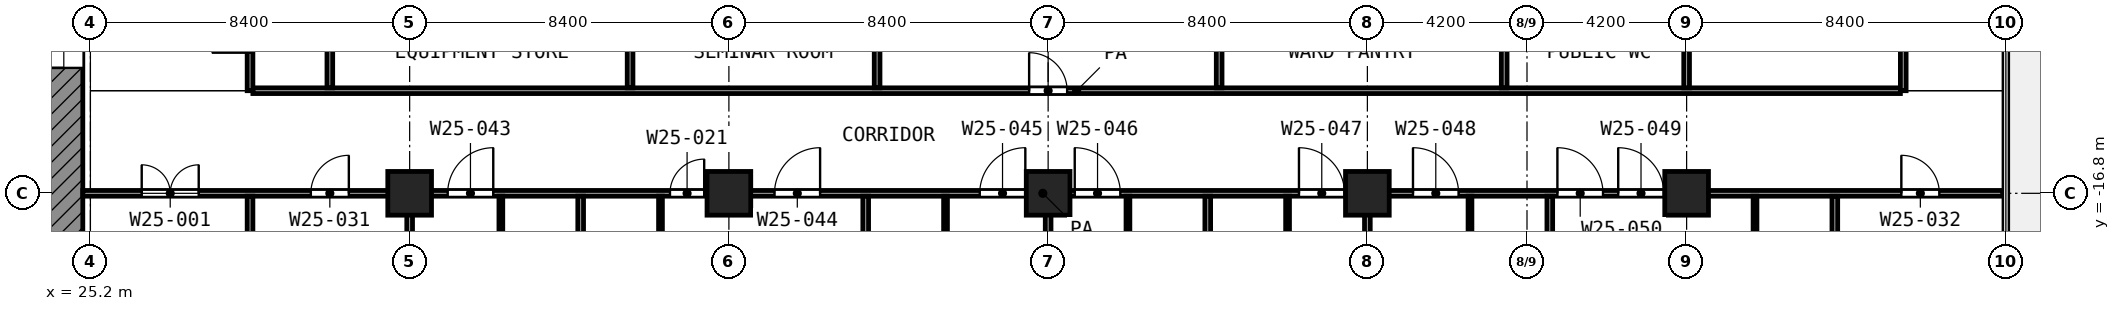
"""IFC4 building model, lengths in metres.
Left out: names, types, materials, properties, quantities, classifications, styles, units other than length and angle.
Written with IfcOpenShell. Run it as: python <this file> out.ifc"""

import sys

from ifc_helpers import new_model, si_unit, direction, frame, frame_2d, origin, origin_2d, place, context, subcontext, project, spatial, rectangle, extrude, element, fill, save


model = new_model("IFC4")
c1 = context("Model", 3, precision=1e-05, world=origin(), true_north=direction((0.0, 1.0)))
c2 = subcontext(c1, "Body", "Model", "MODEL_VIEW")
j1 = project(units=[si_unit("LENGTHUNIT", "METRE"), si_unit("PLANEANGLEUNIT", "RADIAN")], contexts=[c1])
p1 = place(None, origin())
s1 = spatial("IfcSite", under=j1, at=p1, CompositionType="ELEMENT")
p2 = place(p1, origin())
s2 = spatial("IfcBuilding", under=s1, at=p2, CompositionType="ELEMENT")
p3 = place(p2, frame((0.0, 0.0, 132.4)))
s3 = spatial("IfcBuildingStorey", under=s2, at=p3, CompositionType="ELEMENT", Elevation=132.4)
for number, where, z_axis, x_axis in (
    (1, (33.6, -16.8, 0.0), (0.0, 0.0, 1.0), (1.0, 0.0, 0.0)),
    (2, (42.0, -16.8, 0.0), (0.0, 0.0, 1.0), (1.0, 0.0, 0.0)),
    (3, (50.4, -16.8, 0.0), (0.0, 0.0, 1.0), (1.0, 0.0, 0.0)),
    (4, (58.8, -16.8, 0.0), (0.0, 0.0, 1.0), (1.0, 0.0, 0.0)),
    (5, (67.2, -16.8, 0.0), (0.0, 0.0, 1.0), (1.0, 0.0, 0.0)),
):
    element("IfcColumn", number, at=place(p3, frame(where, z_axis=z_axis, x_axis=x_axis)), inside=s3, PredefinedType="COLUMN", context=c2, shape_type="SweptSolid", body=[
        extrude(rectangle(XDim=1.15, YDim=1.15, at=origin_2d()), origin(), (0.0, 0.0, 1.0), 4.2),
    ])
p4 = place(p3, frame((24.5, -24.0, 0.0), z_axis=(0.0, 0.0, 1.0), x_axis=(0.0, 1.0, 0.0)))
e6 = element("IfcWall", 6, at=p4, inside=s3, PredefinedType="SHEAR", context=c2, shape_type="SweptSolid", body=[
    extrude(rectangle(XDim=18.6, YDim=1.0, at=frame_2d((9.3, 0.0))), origin(), (0.0, 0.0, 1.0), 3.6),
])
p5 = place(p4, frame((10.5, 0.0, 0.0)))
e7 = element("IfcOpeningElement", 7, at=p5, cuts=e6, PredefinedType="OPENING", context=c2, shape_type="SweptSolid", body=[
    extrude(rectangle(XDim=1.8, YDim=2.1, at=frame_2d((0.9, 1.05))), frame((0.0, 0.51, 0.0), z_axis=(0.0, -1.0, 0.0), x_axis=(1.0, 0.0, 0.0)), (0.0, 0.0, 1.0), 1.02),
])
p6 = place(p3, frame((36.0, -20.1, 0.0), z_axis=(0.0, 0.0, 1.0), x_axis=(0.0, 1.0, 0.0)))
e8 = element("IfcWall", 8, at=p6, inside=s3, PredefinedType="PARTITIONING", context=c2, shape_type="SweptSolid", body=[
    extrude(rectangle(XDim=3.225, YDim=0.1, at=frame_2d((1.613, 0.0))), origin(), (0.0, 0.0, 1.0), 3.6),
])
p7 = place(p3, frame((40.2, -19.499, 0.0), z_axis=(0.0, 0.0, 1.0), x_axis=(0.0, 1.0, 0.0)))
e9 = element("IfcWall", 9, at=p7, inside=s3, PredefinedType="PARTITIONING", context=c2, shape_type="SweptSolid", body=[
    extrude(rectangle(XDim=2.624, YDim=0.1, at=frame_2d((1.312, 0.0))), origin(), (0.0, 0.0, 1.0), 3.6),
])
for number, where, z_axis, x_axis in (
    (10, (47.7, -20.1, 0.0), (0.0, 0.0, 1.0), (0.0, 1.0, 0.0)),
    (11, (52.5, -20.1, 0.0), (0.0, 0.0, 1.0), (0.0, 1.0, 0.0)),
):
    element("IfcWall", number, at=place(p3, frame(where, z_axis=z_axis, x_axis=x_axis)), inside=s3, PredefinedType="PARTITIONING", context=c2, shape_type="SweptSolid", body=[
        extrude(rectangle(XDim=3.225, YDim=0.1, at=frame_2d((1.613, 0.0))), origin(), (0.0, 0.0, 1.0), 3.6),
    ])
for number, where, z_axis, x_axis in (
    (12, (56.7, -19.5, 0.0), (0.0, 0.0, 1.0), (0.0, 1.0, 0.0)),
    (13, (61.5, -19.5, 0.0), (0.0, 0.0, 1.0), (0.0, 1.0, 0.0)),
):
    element("IfcWall", number, at=place(p3, frame(where, z_axis=z_axis, x_axis=x_axis)), inside=s3, PredefinedType="PARTITIONING", context=c2, shape_type="SweptSolid", body=[
        extrude(rectangle(XDim=2.625, YDim=0.1, at=frame_2d((1.312, 0.0))), origin(), (0.0, 0.0, 1.0), 3.6),
    ])
p8 = place(p3, frame((69.0, -20.099, 0.0), z_axis=(0.0, 0.0, 1.0), x_axis=(0.0, 1.0, 0.0)))
e14 = element("IfcWall", 14, at=p8, inside=s3, PredefinedType="PARTITIONING", context=c2, shape_type="SweptSolid", body=[
    extrude(rectangle(XDim=3.224, YDim=0.1, at=frame_2d((1.612, 0.0))), origin(), (0.0, 0.0, 1.0), 3.6),
])
p9 = place(p3, frame((25.0, -16.8, 0.0), z_axis=(0.0, 0.0, 1.0), x_axis=(1.0, 0.0, 0.0)))
e15 = element("IfcWall", 15, at=p9, inside=s3, PredefinedType="PARTITIONING", context=c2, shape_type="SweptSolid", body=[
    extrude(rectangle(XDim=50.52, YDim=0.15, at=frame_2d((25.26, 0.0))), origin(), (0.0, 0.0, 1.0), 3.6),
])
p10 = place(p9, frame((1.55, 0.0, 0.0)))
e16 = element("IfcOpeningElement", 16, at=p10, cuts=e15, PredefinedType="OPENING", context=c2, shape_type="SweptSolid", body=[
    extrude(rectangle(XDim=1.5, YDim=2.1, at=frame_2d((0.75, 1.05))), frame((0.0, 0.085, 0.0), z_axis=(0.0, -1.0, 0.0), x_axis=(1.0, 0.0, 0.0)), (0.0, 0.0, 1.0), 0.17),
])
p11 = place(p9, frame((6.0, 0.0, 0.0)))
e17 = element("IfcOpeningElement", 17, at=p11, cuts=e15, PredefinedType="OPENING", context=c2, shape_type="SweptSolid", body=[
    extrude(rectangle(XDim=1.0, YDim=2.1, at=frame_2d((0.5, 1.05))), frame((0.0, 0.085, 0.0), z_axis=(0.0, -1.0, 0.0), x_axis=(1.0, 0.0, 0.0)), (0.0, 0.0, 1.0), 0.17),
])
p12 = place(p9, frame((9.6, 0.0, 0.0)))
e18 = element("IfcOpeningElement", 18, at=p12, cuts=e15, PredefinedType="OPENING", context=c2, shape_type="SweptSolid", body=[
    extrude(rectangle(XDim=1.2, YDim=2.1, at=frame_2d((0.6, 1.05))), frame((0.0, 0.085, 0.0), z_axis=(0.0, -1.0, 0.0), x_axis=(1.0, 0.0, 0.0)), (0.0, 0.0, 1.0), 0.17),
])
p13 = place(p9, frame((18.2, 0.0, 0.0)))
e19 = element("IfcOpeningElement", 19, at=p13, cuts=e15, PredefinedType="OPENING", context=c2, shape_type="SweptSolid", body=[
    extrude(rectangle(XDim=1.2, YDim=2.1, at=frame_2d((0.6, 1.05))), frame((0.0, 0.085, 0.0), z_axis=(0.0, -1.0, 0.0), x_axis=(1.0, 0.0, 0.0)), (0.0, 0.0, 1.0), 0.17),
])
p14 = place(p9, frame((15.45, 0.0, 0.0)))
e20 = element("IfcOpeningElement", 20, at=p14, cuts=e15, PredefinedType="OPENING", context=c2, shape_type="SweptSolid", body=[
    extrude(rectangle(XDim=0.9, YDim=2.1, at=frame_2d((0.45, 1.05))), frame((0.0, 0.085, 0.0), z_axis=(0.0, -1.0, 0.0), x_axis=(1.0, 0.0, 0.0)), (0.0, 0.0, 1.0), 0.17),
])
p15 = place(p9, frame((23.6, 0.0, 0.0)))
e21 = element("IfcOpeningElement", 21, at=p15, cuts=e15, PredefinedType="OPENING", context=c2, shape_type="SweptSolid", body=[
    extrude(rectangle(XDim=1.2, YDim=2.1, at=frame_2d((0.6, 1.05))), frame((0.0, 0.085, 0.0), z_axis=(0.0, -1.0, 0.0), x_axis=(1.0, 0.0, 0.0)), (0.0, 0.0, 1.0), 0.17),
])
p16 = place(p9, frame((26.1, 0.0, 0.0)))
e22 = element("IfcOpeningElement", 22, at=p16, cuts=e15, PredefinedType="OPENING", context=c2, shape_type="SweptSolid", body=[
    extrude(rectangle(XDim=1.2, YDim=2.1, at=frame_2d((0.6, 1.05))), frame((0.0, 0.085, 0.0), z_axis=(0.0, -1.0, 0.0), x_axis=(1.0, 0.0, 0.0)), (0.0, 0.0, 1.0), 0.17),
])
p17 = place(p9, frame((32.0, 0.0, 0.0)))
e23 = element("IfcOpeningElement", 23, at=p17, cuts=e15, PredefinedType="OPENING", context=c2, shape_type="SweptSolid", body=[
    extrude(rectangle(XDim=1.2, YDim=2.1, at=frame_2d((0.6, 1.05))), frame((0.0, 0.085, 0.0), z_axis=(0.0, -1.0, 0.0), x_axis=(1.0, 0.0, 0.0)), (0.0, 0.0, 1.0), 0.17),
])
p18 = place(p9, frame((35.0, 0.0, 0.0)))
e24 = element("IfcOpeningElement", 24, at=p18, cuts=e15, PredefinedType="OPENING", context=c2, shape_type="SweptSolid", body=[
    extrude(rectangle(XDim=1.2, YDim=2.1, at=frame_2d((0.6, 1.05))), frame((0.0, 0.085, 0.0), z_axis=(0.0, -1.0, 0.0), x_axis=(1.0, 0.0, 0.0)), (0.0, 0.0, 1.0), 0.17),
])
p19 = place(p9, frame((40.4, 0.0, 0.0)))
e25 = element("IfcOpeningElement", 25, at=p19, cuts=e15, PredefinedType="OPENING", context=c2, shape_type="SweptSolid", body=[
    extrude(rectangle(XDim=1.2, YDim=2.1, at=frame_2d((0.6, 1.05))), frame((0.0, 0.085, 0.0), z_axis=(0.0, -1.0, 0.0), x_axis=(1.0, 0.0, 0.0)), (0.0, 0.0, 1.0), 0.17),
])
p20 = place(p9, frame((38.8, 0.0, 0.0)))
e26 = element("IfcOpeningElement", 26, at=p20, cuts=e15, PredefinedType="OPENING", context=c2, shape_type="SweptSolid", body=[
    extrude(rectangle(XDim=1.2, YDim=2.1, at=frame_2d((0.6, 1.05))), frame((0.0, 0.085, 0.0), z_axis=(0.0, -1.0, 0.0), x_axis=(1.0, 0.0, 0.0)), (0.0, 0.0, 1.0), 0.17),
])
p21 = place(p9, frame((47.85, 0.0, 0.0)))
e27 = element("IfcOpeningElement", 27, at=p21, cuts=e15, PredefinedType="OPENING", context=c2, shape_type="SweptSolid", body=[
    extrude(rectangle(XDim=1.0, YDim=2.1, at=frame_2d((0.5, 1.05))), frame((0.0, 0.085, 0.0), z_axis=(0.0, -1.0, 0.0), x_axis=(1.0, 0.0, 0.0)), (0.0, 0.0, 1.0), 0.17),
])
p22 = place(p3, frame((29.475, -14.1, 0.0), z_axis=(0.0, 0.0, 1.0), x_axis=(1.0, 0.0, 0.0)))
e28 = element("IfcWall", 28, at=p22, inside=s3, PredefinedType="PARTITIONING", context=c2, shape_type="SweptSolid", body=[
    extrude(rectangle(XDim=43.35, YDim=0.15, at=frame_2d((21.675, 0.0))), origin(), (0.0, 0.0, 1.0), 3.6),
])
p23 = place(p22, frame((20.425, 0.0, 0.0)))
e29 = element("IfcOpeningElement", 29, at=p23, cuts=e28, PredefinedType="OPENING", context=c2, shape_type="SweptSolid", body=[
    extrude(rectangle(XDim=1.0, YDim=2.1, at=frame_2d((0.5, 1.05))), frame((0.0, 0.085, 0.0), z_axis=(0.0, -1.0, 0.0), x_axis=(1.0, 0.0, 0.0)), (0.0, 0.0, 1.0), 0.17),
])
p24 = place(p3, frame((29.4, -25.2, 0.0), z_axis=(0.0, 0.0, 1.0), x_axis=(0.0, 1.0, 0.0)))
e30 = element("IfcWall", 30, at=p24, inside=s3, PredefinedType="PARTITIONING", context=c2, shape_type="SweptSolid", body=[
    extrude(rectangle(XDim=8.325, YDim=0.15, at=frame_2d((4.163, 0.0))), origin(), (0.0, 0.0, 1.0), 3.6),
])
p25 = place(p3, frame((29.4, -14.1, 0.0), z_axis=(0.0, 0.0, 1.0), x_axis=(0.0, 1.0, 0.0)))
e31 = element("IfcWall", 31, at=p25, inside=s3, PredefinedType="PARTITIONING", context=c2, shape_type="SweptSolid", body=[
    extrude(rectangle(XDim=3.0, YDim=0.15, at=frame_2d((1.5, 0.0))), origin(), (0.0, 0.0, 1.0), 3.6),
])
p26 = place(p25, frame((1.0, 0.0, 0.0)))
e32 = element("IfcOpeningElement", 32, at=p26, cuts=e31, PredefinedType="OPENING", context=c2, shape_type="SweptSolid", body=[
    extrude(rectangle(XDim=1.0, YDim=2.1, at=frame_2d((0.5, 1.05))), frame((0.0, 0.085, 0.0), z_axis=(0.0, -1.0, 0.0), x_axis=(1.0, 0.0, 0.0)), (0.0, 0.0, 1.0), 0.17),
])
p27 = place(p3, frame((31.5, -14.025, 0.0), z_axis=(0.0, 0.0, 1.0), x_axis=(0.0, 1.0, 0.0)))
e33 = element("IfcWall", 33, at=p27, inside=s3, PredefinedType="PARTITIONING", context=c2, shape_type="SweptSolid", body=[
    extrude(rectangle(XDim=2.85, YDim=0.15, at=frame_2d((1.425, 0.0))), origin(), (0.0, 0.0, 1.0), 3.6),
])
for number, where, z_axis, x_axis in (
    (34, (33.6, -25.12, 0.0), (0.0, 0.0, 1.0), (0.0, 1.0, 0.0)),
    (35, (38.1, -25.12, 0.0), (0.0, 0.0, 1.0), (0.0, 1.0, 0.0)),
):
    element("IfcWall", number, at=place(p3, frame(where, z_axis=z_axis, x_axis=x_axis)), inside=s3, PredefinedType="PARTITIONING", context=c2, shape_type="SweptSolid", body=[
        extrude(rectangle(XDim=8.245, YDim=0.15, at=frame_2d((4.123, 0.0))), origin(), (0.0, 0.0, 1.0), 2.7),
    ])
p28 = place(p3, frame((39.4, -14.025, 0.0), z_axis=(0.0, 0.0, 1.0), x_axis=(0.0, 1.0, 0.0)))
e36 = element("IfcWall", 36, at=p28, inside=s3, PredefinedType="PARTITIONING", context=c2, shape_type="SweptSolid", body=[
    extrude(rectangle(XDim=2.85, YDim=0.15, at=frame_2d((1.425, 0.0))), origin(), (0.0, 0.0, 1.0), 3.6),
])
p29 = place(p3, frame((45.6, -25.12, 0.0), z_axis=(0.0, 0.0, 1.0), x_axis=(0.0, 1.0, 0.0)))
e37 = element("IfcWall", 37, at=p29, inside=s3, PredefinedType="PARTITIONING", context=c2, shape_type="SweptSolid", body=[
    extrude(rectangle(XDim=8.245, YDim=0.15, at=frame_2d((4.123, 0.0))), origin(), (0.0, 0.0, 1.0), 2.7),
])
p30 = place(p3, frame((45.9, -14.025, 0.0), z_axis=(0.0, 0.0, 1.0), x_axis=(0.0, 1.0, 0.0)))
e38 = element("IfcWall", 38, at=p30, inside=s3, PredefinedType="PARTITIONING", context=c2, shape_type="SweptSolid", body=[
    extrude(rectangle(XDim=2.85, YDim=0.15, at=frame_2d((1.425, 0.0))), origin(), (0.0, 0.0, 1.0), 3.6),
])
p31 = place(p3, frame((50.4, -25.12, 0.0), z_axis=(0.0, 0.0, 1.0), x_axis=(0.0, 1.0, 0.0)))
e39 = element("IfcWall", 39, at=p31, inside=s3, PredefinedType="PARTITIONING", context=c2, shape_type="SweptSolid", body=[
    extrude(rectangle(XDim=8.245, YDim=0.15, at=frame_2d((4.123, 0.0))), origin(), (0.0, 0.0, 1.0), 3.6),
])
p32 = place(p3, frame((54.6, -25.12, 0.0), z_axis=(0.0, 0.0, 1.0), x_axis=(0.0, 1.0, 0.0)))
e40 = element("IfcWall", 40, at=p32, inside=s3, PredefinedType="PARTITIONING", context=c2, shape_type="SweptSolid", body=[
    extrude(rectangle(XDim=8.245, YDim=0.15, at=frame_2d((4.123, 0.0))), origin(), (0.0, 0.0, 1.0), 2.7),
])
p33 = place(p3, frame((54.9, -14.025, 0.0), z_axis=(0.0, 0.0, 1.0), x_axis=(0.0, 1.0, 0.0)))
e41 = element("IfcWall", 41, at=p33, inside=s3, PredefinedType="PARTITIONING", context=c2, shape_type="SweptSolid", body=[
    extrude(rectangle(XDim=2.85, YDim=0.15, at=frame_2d((1.425, 0.0))), origin(), (0.0, 0.0, 1.0), 3.6),
])
p34 = place(p3, frame((58.8, -25.12, 0.0), z_axis=(0.0, 0.0, 1.0), x_axis=(0.0, 1.0, 0.0)))
e42 = element("IfcWall", 42, at=p34, inside=s3, PredefinedType="PARTITIONING", context=c2, shape_type="SweptSolid", body=[
    extrude(rectangle(XDim=8.245, YDim=0.15, at=frame_2d((4.123, 0.0))), origin(), (0.0, 0.0, 1.0), 3.6),
])
p35 = place(p3, frame((62.4, -14.025, 0.0), z_axis=(0.0, 0.0, 1.0), x_axis=(0.0, 1.0, 0.0)))
e43 = element("IfcWall", 43, at=p35, inside=s3, PredefinedType="PARTITIONING", context=c2, shape_type="SweptSolid", body=[
    extrude(rectangle(XDim=2.85, YDim=0.15, at=frame_2d((1.425, 0.0))), origin(), (0.0, 0.0, 1.0), 3.6),
])
p36 = place(p3, frame((63.6, -25.12, 0.0), z_axis=(0.0, 0.0, 1.0), x_axis=(0.0, 1.0, 0.0)))
e44 = element("IfcWall", 44, at=p36, inside=s3, PredefinedType="PARTITIONING", context=c2, shape_type="SweptSolid", body=[
    extrude(rectangle(XDim=8.245, YDim=0.15, at=frame_2d((4.123, 0.0))), origin(), (0.0, 0.0, 1.0), 2.7),
])
p37 = place(p3, frame((67.2, -14.025, 0.0), z_axis=(0.0, 0.0, 1.0), x_axis=(0.0, 1.0, 0.0)))
e45 = element("IfcWall", 45, at=p37, inside=s3, PredefinedType="PARTITIONING", context=c2, shape_type="SweptSolid", body=[
    extrude(rectangle(XDim=2.85, YDim=0.15, at=frame_2d((1.425, 0.0))), origin(), (0.0, 0.0, 1.0), 3.6),
])
p38 = place(p3, frame((71.1, -23.587, 0.0), z_axis=(0.0, 0.0, 1.0), x_axis=(0.0, 1.0, 0.0)))
e46 = element("IfcWall", 46, at=p38, inside=s3, PredefinedType="PARTITIONING", context=c2, shape_type="SweptSolid", body=[
    extrude(rectangle(XDim=6.712, YDim=0.15, at=frame_2d((3.356, 0.0))), origin(), (0.0, 0.0, 1.0), 2.7),
])
p39 = place(p3, frame((72.9, -14.1, 0.0), z_axis=(0.0, 0.0, 1.0), x_axis=(0.0, 1.0, 0.0)))
e47 = element("IfcWall", 47, at=p39, inside=s3, PredefinedType="PARTITIONING", context=c2, shape_type="SweptSolid", body=[
    extrude(rectangle(XDim=3.0, YDim=0.15, at=frame_2d((1.5, 0.0))), origin(), (0.0, 0.0, 1.0), 3.6),
])
p40 = place(p5, origin())
e48 = element("IfcDoor", 48, at=p40, inside=s3, OperationType="DOUBLE_DOOR_SINGLE_SWING", PredefinedType="DOOR", context=c2, shape_type="SweptSolid", body=[
    extrude(rectangle(XDim=1.8, YDim=2.1, at=frame_2d((0.9, 1.05))), frame((0.0, 0.025, 0.0), z_axis=(0.0, -1.0, 0.0), x_axis=(1.0, 0.0, 0.0)), (0.0, 0.0, 1.0), 0.05),
])
fill(e7, e48)
p41 = place(p10, origin())
e49 = element("IfcDoor", 49, at=p41, inside=s3, OperationType="DOUBLE_DOOR_SINGLE_SWING", PredefinedType="DOOR", context=c2, shape_type="SweptSolid", body=[
    extrude(rectangle(XDim=1.5, YDim=2.1, at=frame_2d((0.75, 1.05))), frame((0.0, 0.025, 0.0), z_axis=(0.0, -1.0, 0.0), x_axis=(1.0, 0.0, 0.0)), (0.0, 0.0, 1.0), 0.05),
])
fill(e16, e49)
p42 = place(p23, origin())
e50 = element("IfcDoor", 50, at=p42, inside=s3, OperationType="SINGLE_SWING_LEFT", PredefinedType="DOOR", context=c2, shape_type="SweptSolid", body=[
    extrude(rectangle(XDim=1.0, YDim=2.1, at=frame_2d((0.5, 1.05))), frame((0.0, 0.025, 0.0), z_axis=(0.0, -1.0, 0.0), x_axis=(1.0, 0.0, 0.0)), (0.0, 0.0, 1.0), 0.05),
])
fill(e29, e50)
p43 = place(p11, origin())
e51 = element("IfcDoor", 51, at=p43, inside=s3, OperationType="SINGLE_SWING_RIGHT", PredefinedType="DOOR", context=c2, shape_type="SweptSolid", body=[
    extrude(rectangle(XDim=1.0, YDim=2.1, at=frame_2d((0.5, 1.05))), frame((0.0, 0.025, 0.0), z_axis=(0.0, -1.0, 0.0), x_axis=(1.0, 0.0, 0.0)), (0.0, 0.0, 1.0), 0.05),
])
fill(e17, e51)
p44 = place(p12, origin())
e52 = element("IfcDoor", 52, at=p44, inside=s3, OperationType="SINGLE_SWING_RIGHT", PredefinedType="DOOR", context=c2, shape_type="SweptSolid", body=[
    extrude(rectangle(XDim=1.2, YDim=2.1, at=frame_2d((0.6, 1.05))), frame((0.0, 0.025, 0.0), z_axis=(0.0, -1.0, 0.0), x_axis=(1.0, 0.0, 0.0)), (0.0, 0.0, 1.0), 0.05),
])
fill(e18, e52)
p45 = place(p13, origin())
e53 = element("IfcDoor", 53, at=p45, inside=s3, OperationType="SINGLE_SWING_RIGHT", PredefinedType="DOOR", context=c2, shape_type="SweptSolid", body=[
    extrude(rectangle(XDim=1.2, YDim=2.1, at=frame_2d((0.6, 1.05))), frame((0.0, 0.025, 0.0), z_axis=(0.0, -1.0, 0.0), x_axis=(1.0, 0.0, 0.0)), (0.0, 0.0, 1.0), 0.05),
])
fill(e19, e53)
p46 = place(p14, origin())
e54 = element("IfcDoor", 54, at=p46, inside=s3, OperationType="SINGLE_SWING_RIGHT", PredefinedType="DOOR", context=c2, shape_type="SweptSolid", body=[
    extrude(rectangle(XDim=0.9, YDim=2.1, at=frame_2d((0.45, 1.05))), frame((0.0, 0.025, 0.0), z_axis=(0.0, -1.0, 0.0), x_axis=(1.0, 0.0, 0.0)), (0.0, 0.0, 1.0), 0.05),
])
fill(e20, e54)
p47 = place(p15, origin())
e55 = element("IfcDoor", 55, at=p47, inside=s3, OperationType="SINGLE_SWING_RIGHT", PredefinedType="DOOR", context=c2, shape_type="SweptSolid", body=[
    extrude(rectangle(XDim=1.2, YDim=2.1, at=frame_2d((0.6, 1.05))), frame((0.0, 0.025, 0.0), z_axis=(0.0, -1.0, 0.0), x_axis=(1.0, 0.0, 0.0)), (0.0, 0.0, 1.0), 0.05),
])
fill(e21, e55)
p48 = place(p16, origin())
e56 = element("IfcDoor", 56, at=p48, inside=s3, OperationType="SINGLE_SWING_LEFT", PredefinedType="DOOR", context=c2, shape_type="SweptSolid", body=[
    extrude(rectangle(XDim=1.2, YDim=2.1, at=frame_2d((0.6, 1.05))), frame((0.0, 0.025, 0.0), z_axis=(0.0, -1.0, 0.0), x_axis=(1.0, 0.0, 0.0)), (0.0, 0.0, 1.0), 0.05),
])
fill(e22, e56)
p49 = place(p17, origin())
e57 = element("IfcDoor", 57, at=p49, inside=s3, OperationType="SINGLE_SWING_LEFT", PredefinedType="DOOR", context=c2, shape_type="SweptSolid", body=[
    extrude(rectangle(XDim=1.2, YDim=2.1, at=frame_2d((0.6, 1.05))), frame((0.0, 0.025, 0.0), z_axis=(0.0, -1.0, 0.0), x_axis=(1.0, 0.0, 0.0)), (0.0, 0.0, 1.0), 0.05),
])
fill(e23, e57)
p50 = place(p18, origin())
e58 = element("IfcDoor", 58, at=p50, inside=s3, OperationType="SINGLE_SWING_LEFT", PredefinedType="DOOR", context=c2, shape_type="SweptSolid", body=[
    extrude(rectangle(XDim=1.2, YDim=2.1, at=frame_2d((0.6, 1.05))), frame((0.0, 0.025, 0.0), z_axis=(0.0, -1.0, 0.0), x_axis=(1.0, 0.0, 0.0)), (0.0, 0.0, 1.0), 0.05),
])
fill(e24, e58)
p51 = place(p19, origin())
e59 = element("IfcDoor", 59, at=p51, inside=s3, OperationType="SINGLE_SWING_LEFT", PredefinedType="DOOR", context=c2, shape_type="SweptSolid", body=[
    extrude(rectangle(XDim=1.2, YDim=2.1, at=frame_2d((0.6, 1.05))), frame((0.0, 0.025, 0.0), z_axis=(0.0, -1.0, 0.0), x_axis=(1.0, 0.0, 0.0)), (0.0, 0.0, 1.0), 0.05),
])
fill(e25, e59)
p52 = place(p20, origin())
e60 = element("IfcDoor", 60, at=p52, inside=s3, OperationType="SINGLE_SWING_LEFT", PredefinedType="DOOR", context=c2, shape_type="SweptSolid", body=[
    extrude(rectangle(XDim=1.2, YDim=2.1, at=frame_2d((0.6, 1.05))), frame((0.0, 0.025, 0.0), z_axis=(0.0, -1.0, 0.0), x_axis=(1.0, 0.0, 0.0)), (0.0, 0.0, 1.0), 0.05),
])
fill(e26, e60)
p53 = place(p21, origin())
e61 = element("IfcDoor", 61, at=p53, inside=s3, OperationType="SINGLE_SWING_LEFT", PredefinedType="DOOR", context=c2, shape_type="SweptSolid", body=[
    extrude(rectangle(XDim=1.0, YDim=2.1, at=frame_2d((0.5, 1.05))), frame((0.0, 0.025, 0.0), z_axis=(0.0, -1.0, 0.0), x_axis=(1.0, 0.0, 0.0)), (0.0, 0.0, 1.0), 0.05),
])
fill(e27, e61)
save(model, sys.argv[1])
